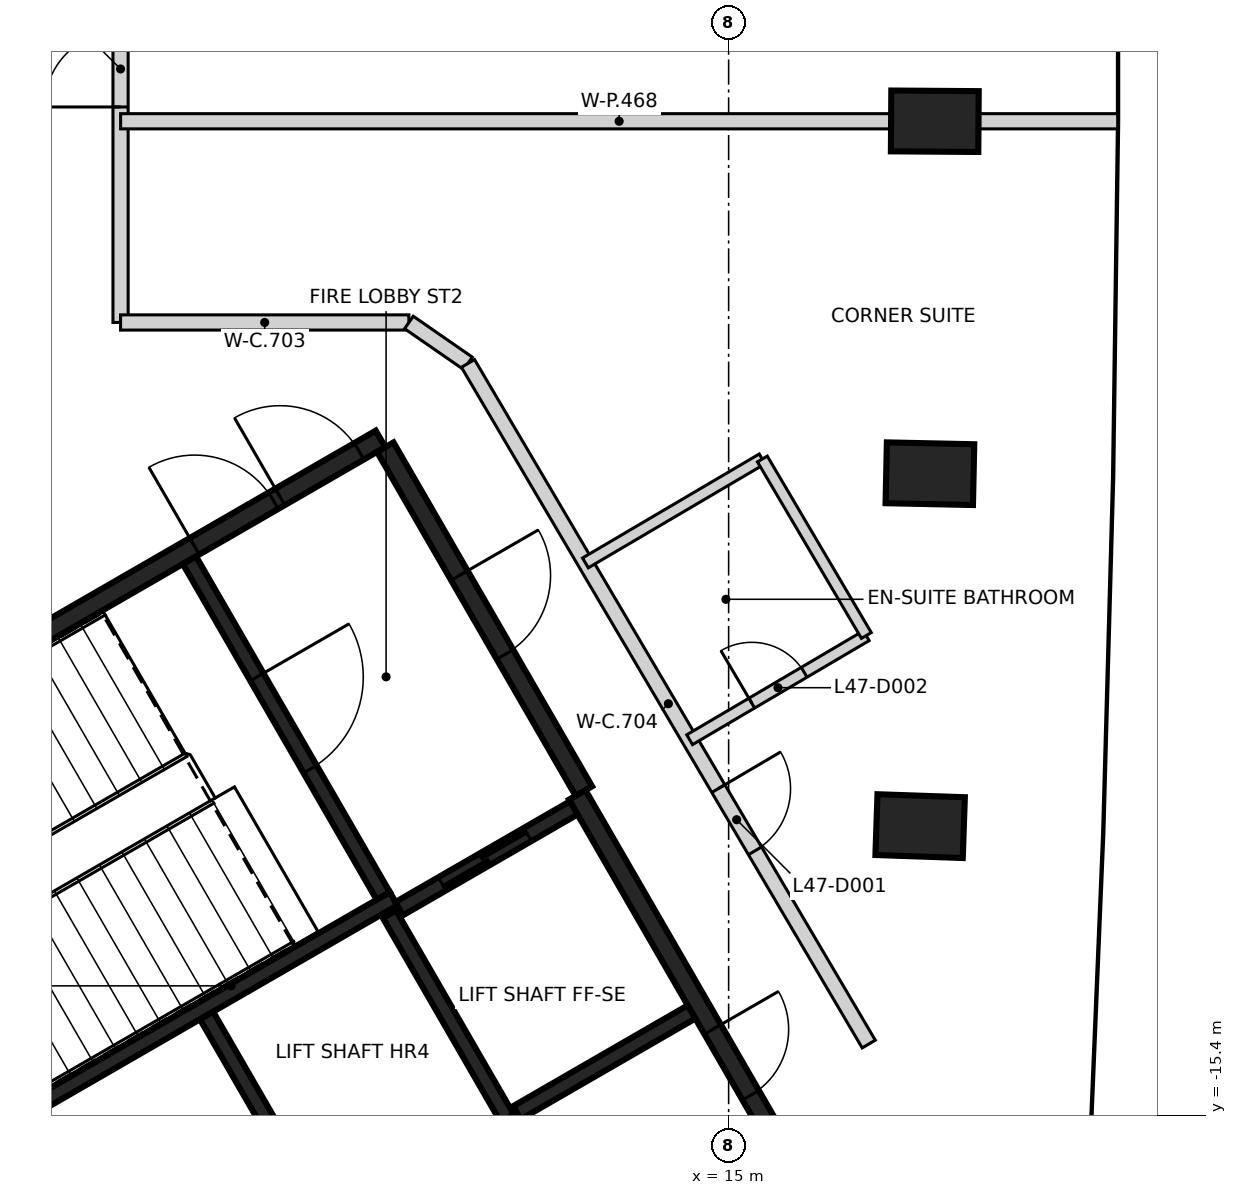
"""IFC4 building model, lengths in metres.
Left out: names, types, materials, properties, quantities, classifications, styles, units other than length and angle.
Written with IfcOpenShell. Run it as: python <this file> out.ifc"""

import sys

from ifc_helpers import new_model, si_unit, direction, frame, frame_2d, origin, origin_2d, place, context, subcontext, project, spatial, rectangle, extrude, element, fill, save


model = new_model("IFC4")
c1 = context("Model", 3, precision=1e-05, world=origin(), true_north=direction((0.0, 1.0)))
c2 = subcontext(c1, "Body", "Model", "MODEL_VIEW")
j1 = project(units=[si_unit("LENGTHUNIT", "METRE"), si_unit("PLANEANGLEUNIT", "RADIAN")], contexts=[c1])
p1 = place(None, origin())
s1 = spatial("IfcSite", under=j1, at=p1, CompositionType="ELEMENT")
p2 = place(p1, origin())
s2 = spatial("IfcBuilding", under=s1, at=p2, CompositionType="ELEMENT")
p3 = place(p2, frame((0.0, 0.0, 190.0)))
s3 = spatial("IfcBuildingStorey", under=s2, at=p3, CompositionType="ELEMENT", Elevation=190.0)
for number, where, z_axis, x_axis in (
    (1, (17.519, -11.592, -0.35), (0.0, 0.0, 1.0), (-0.999, 0.034, 0.0)),
    (2, (17.648, -6.956, -0.35), (0.0, 0.0, 1.0), (-1.0, 0.021, 0.0)),
    (3, (17.712, -2.319, -0.35), (0.0, 0.0, 1.0), (-1.0, 0.007, 0.0)),
):
    element("IfcColumn", number, at=place(p3, frame(where, z_axis=z_axis, x_axis=x_axis)), inside=s3, PredefinedType="COLUMN", context=c2, shape_type="SweptSolid", body=[
        extrude(rectangle(XDim=1.15, YDim=0.8, at=origin_2d()), origin(), (0.0, 0.0, 1.0), 3.6),
    ])
p4 = place(p3, frame((0.417, -12.273, 0.0), z_axis=(0.0, 0.0, 1.0), x_axis=(0.866021906294, 0.500006057782, 0.0)))
e4 = element("IfcWall", 4, at=p4, inside=s3, PredefinedType="SHEAR", context=c2, shape_type="SweptSolid", body=[
    extrude(rectangle(XDim=11.55, YDim=0.25, at=frame_2d((5.775, 0.0))), origin(), (0.0, 0.0, 1.0), 3.25),
])
p5 = place(p4, frame((10.025, 0.0, 0.0)))
e5 = element("IfcOpeningElement", 5, at=p5, cuts=e4, PredefinedType="OPENING", context=c2, shape_type="SweptSolid", body=[
    extrude(rectangle(XDim=1.2, YDim=2.1, at=frame_2d((0.6, 1.05))), frame((0.0, 0.135, 0.0), z_axis=(0.0, -1.0, 0.0), x_axis=(1.0, 0.0, 0.0)), (0.0, 0.0, 1.0), 0.27),
])
p6 = place(p4, frame((8.725, 0.0, 0.0)))
e6 = element("IfcOpeningElement", 6, at=p6, cuts=e4, PredefinedType="OPENING", context=c2, shape_type="SweptSolid", body=[
    extrude(rectangle(XDim=1.2, YDim=2.1, at=frame_2d((0.6, 1.05))), frame((0.0, 0.135, 0.0), z_axis=(0.0, -1.0, 0.0), x_axis=(1.0, 0.0, 0.0)), (0.0, 0.0, 1.0), 0.27),
])
p7 = place(p3, frame((13.008, -11.181, 0.0), z_axis=(0.0, 0.0, 1.0), x_axis=(0.500001955336, -0.866024274868, 0.0)))
e7 = element("IfcWall", 7, at=p7, inside=s3, PredefinedType="SHEAR", context=c2, shape_type="SweptSolid", body=[
    extrude(rectangle(XDim=6.125, YDim=0.25, at=frame_2d((3.062, 0.0))), origin(), (0.0, 0.0, 1.0), 3.25),
])
p8 = place(p7, frame((3.563, 0.0, 0.0)))
e8 = element("IfcOpeningElement", 8, at=p8, cuts=e7, PredefinedType="OPENING", context=c2, shape_type="SweptSolid", body=[
    extrude(rectangle(XDim=1.0, YDim=2.1, at=frame_2d((0.5, 1.05))), frame((0.0, 0.135, 0.0), z_axis=(0.0, -1.0, 0.0), x_axis=(1.0, 0.0, 0.0)), (0.0, 0.0, 1.0), 0.27),
])
p9 = place(p3, frame((10.483, -6.606, 0.0), z_axis=(0.0, 0.0, 1.0), x_axis=(0.49999885962, -0.866026062182, 0.0)))
e9 = element("IfcWall", 9, at=p9, inside=s3, PredefinedType="SHEAR", context=c2, shape_type="SweptSolid", body=[
    extrude(rectangle(XDim=5.225, YDim=0.25, at=frame_2d((2.612, 0.0))), origin(), (0.0, 0.0, 1.0), 3.25),
])
p10 = place(p9, frame((1.95, 0.0, 0.0)))
e10 = element("IfcOpeningElement", 10, at=p10, cuts=e9, PredefinedType="OPENING", context=c2, shape_type="SweptSolid", body=[
    extrude(rectangle(XDim=1.2, YDim=2.1, at=frame_2d((0.6, 1.05))), frame((0.0, 0.135, 0.0), z_axis=(0.0, -1.0, 0.0), x_axis=(1.0, 0.0, 0.0)), (0.0, 0.0, 1.0), 0.27),
])
p11 = place(p3, frame((5.419, -15.534, 0.0), z_axis=(0.0, 0.0, 1.0), x_axis=(0.866029065029, 0.499993658486, 0.0)))
e11 = element("IfcWall", 11, at=p11, inside=s3, PredefinedType="SHEAR", context=c2, shape_type="SweptSolid", body=[
    extrude(rectangle(XDim=5.974, YDim=0.2, at=frame_2d((2.987, 0.0))), origin(), (0.0, 0.0, 1.0), 3.25),
])
p12 = place(p3, frame((7.01, -18.542, 0.0), z_axis=(0.0, 0.0, 1.0), x_axis=(0.866030299012, 0.499991521122, 0.0)))
e12 = element("IfcWall", 12, at=p12, inside=s3, PredefinedType="SHEAR", context=c2, shape_type="SweptSolid", body=[
    extrude(rectangle(XDim=6.1, YDim=0.2, at=frame_2d((3.05, 0.0))), origin(), (0.0, 0.0, 1.0), 3.25),
])
p13 = place(p12, frame((1.0, 0.0, 0.0)))
e13 = element("IfcOpeningElement", 13, at=p13, cuts=e12, PredefinedType="OPENING", context=c2, shape_type="SweptSolid", body=[
    extrude(rectangle(XDim=1.2, YDim=2.1, at=frame_2d((0.6, 1.05))), frame((0.0, 0.11, 0.0), z_axis=(0.0, -1.0, 0.0), x_axis=(1.0, 0.0, 0.0)), (0.0, 0.0, 1.0), 0.22),
])
p14 = place(p12, frame((3.982, 0.0, 0.0)))
e14 = element("IfcOpeningElement", 14, at=p14, cuts=e12, PredefinedType="OPENING", context=c2, shape_type="SweptSolid", body=[
    extrude(rectangle(XDim=1.2, YDim=2.1, at=frame_2d((0.6, 1.05))), frame((0.0, 0.11, 0.0), z_axis=(0.0, -1.0, 0.0), x_axis=(1.0, 0.0, 0.0)), (0.0, 0.0, 1.0), 0.22),
])
p15 = place(p3, frame((7.906, -8.094, 0.0), z_axis=(0.0, 0.0, 1.0), x_axis=(0.500027839223, -0.866009330205, 0.0)))
e15 = element("IfcWall", 15, at=p15, inside=s3, PredefinedType="SHEAR", context=c2, shape_type="SweptSolid", body=[
    extrude(rectangle(XDim=5.098, YDim=0.2, at=frame_2d((2.549, 0.0))), origin(), (0.0, 0.0, 1.0), 3.25),
])
p16 = place(p15, frame((1.774, 0.0, 0.0)))
e16 = element("IfcOpeningElement", 16, at=p16, cuts=e15, PredefinedType="OPENING", context=c2, shape_type="SweptSolid", body=[
    extrude(rectangle(XDim=1.4, YDim=2.1, at=frame_2d((0.7, 1.05))), frame((0.0, 0.11, 0.0), z_axis=(0.0, -1.0, 0.0), x_axis=(1.0, 0.0, 0.0)), (0.0, 0.0, 1.0), 0.22),
])
p17 = place(p3, frame((8.132, -14.084, 0.0), z_axis=(0.0, 0.0, 1.0), x_axis=(0.499997778408, -0.866026686418, 0.0)))
e17 = element("IfcWall", 17, at=p17, inside=s3, PredefinedType="SHEAR", context=c2, shape_type="SweptSolid", body=[
    extrude(rectangle(XDim=3.198, YDim=0.2, at=frame_2d((1.599, 0.0))), origin(), (0.0, 0.0, 1.0), 3.25),
])
p18 = place(p3, frame((12.088, -15.437, 0.0), z_axis=(0.0, 0.0, 1.0), x_axis=(-0.500026960575, 0.86600983753, 0.0)))
e18 = element("IfcWall", 18, at=p18, inside=s3, PredefinedType="SHEAR", context=c2, shape_type="SweptSolid", body=[
    extrude(rectangle(XDim=3.1, YDim=0.2, at=frame_2d((1.55, 0.0))), origin(), (0.0, 0.0, 1.0), 3.25),
])
p19 = place(p3, frame((10.666, -12.678, 0.0), z_axis=(0.0, 0.0, 1.0), x_axis=(0.866018407898, 0.500012117035, 0.0)))
e19 = element("IfcWall", 19, at=p19, inside=s3, PredefinedType="SHEAR", context=c2, shape_type="SweptSolid", body=[
    extrude(rectangle(XDim=2.651, YDim=0.2, at=frame_2d((1.325, 0.0))), origin(), (0.0, 0.0, 1.0), 3.25),
])
p20 = place(p19, frame((0.652, 0.0, 0.0)))
e20 = element("IfcOpeningElement", 20, at=p20, cuts=e19, PredefinedType="OPENING", context=c2, shape_type="SweptSolid", body=[
    extrude(rectangle(XDim=1.3, YDim=2.1, at=frame_2d((0.65, 1.05))), frame((0.0, 0.11, 0.0), z_axis=(0.0, -1.0, 0.0), x_axis=(1.0, 0.0, 0.0)), (0.0, 0.0, 1.0), 0.22),
])
p21 = place(p3, frame((14.512, -14.037, 0.0), z_axis=(0.0, 0.0, 1.0), x_axis=(-0.866018407898, -0.500012117035, 0.0)))
e21 = element("IfcWall", 21, at=p21, inside=s3, PredefinedType="SHEAR", context=c2, shape_type="SweptSolid", body=[
    extrude(rectangle(XDim=2.651, YDim=0.2, at=frame_2d((1.325, 0.0))), origin(), (0.0, 0.0, 1.0), 3.25),
])
p22 = place(p3, frame((7.0, -4.966, 0.0), z_axis=(0.0, 0.0, 1.0), x_axis=(0.0, 1.0, 0.0)))
e22 = element("IfcWall", 22, at=p22, inside=s3, PredefinedType="PARTITIONING", context=c2, shape_type="SweptSolid", body=[
    extrude(rectangle(XDim=13.225, YDim=0.2, at=frame_2d((6.612, 0.0))), origin(), (0.0, 0.0, 1.0), 3.25),
])
p23 = place(p22, frame((2.835, 0.0, 0.0)))
e23 = element("IfcOpeningElement", 23, at=p23, cuts=e22, PredefinedType="OPENING", context=c2, shape_type="SweptSolid", body=[
    extrude(rectangle(XDim=1.0, YDim=2.1, at=frame_2d((0.5, 1.05))), frame((0.0, 0.11, 0.0), z_axis=(0.0, -1.0, 0.0), x_axis=(1.0, 0.0, 0.0)), (0.0, 0.0, 1.0), 0.22),
])
p24 = place(p22, frame((12.045, 0.0, 0.0)))
e24 = element("IfcOpeningElement", 24, at=p24, cuts=e22, PredefinedType="OPENING", context=c2, shape_type="SweptSolid", body=[
    extrude(rectangle(XDim=0.95, YDim=2.1, at=frame_2d((0.475, 1.05))), frame((0.0, 0.11, 0.0), z_axis=(0.0, -1.0, 0.0), x_axis=(1.0, 0.0, 0.0)), (0.0, 0.0, 1.0), 0.22),
])
p25 = place(p3, frame((7.0, -4.966, 0.0), z_axis=(0.0, 0.0, 1.0), x_axis=(1.0, 0.0, 0.0)))
e25 = element("IfcWall", 25, at=p25, inside=s3, PredefinedType="PARTITIONING", context=c2, shape_type="SweptSolid", body=[
    extrude(rectangle(XDim=3.793, YDim=0.2, at=frame_2d((1.896, 0.0))), origin(), (0.0, 0.0, 1.0), 3.25),
])
p26 = place(p3, frame((10.794, -4.966, 0.0), z_axis=(0.0, 0.0, 1.0), x_axis=(0.822266583859, -0.569102508401, 0.0)))
e26 = element("IfcWall", 26, at=p26, inside=s3, PredefinedType="PARTITIONING", context=c2, shape_type="SweptSolid", body=[
    extrude(rectangle(XDim=0.945, YDim=0.2, at=frame_2d((0.473, 0.0))), origin(), (0.0, 0.0, 1.0), 3.25),
])
p27 = place(p3, frame((11.571, -5.505, 0.0), z_axis=(0.0, 0.0, 1.0), x_axis=(0.507402039651, -0.861709446483, 0.0)))
e27 = element("IfcWall", 27, at=p27, inside=s3, PredefinedType="PARTITIONING", context=c2, shape_type="SweptSolid", body=[
    extrude(rectangle(XDim=10.391, YDim=0.2, at=frame_2d((5.196, 0.0))), origin(), (0.0, 0.0, 1.0), 3.25),
])
p28 = place(p27, frame((6.491, 0.0, 0.0)))
e28 = element("IfcOpeningElement", 28, at=p28, cuts=e27, PredefinedType="OPENING", context=c2, shape_type="SweptSolid", body=[
    extrude(rectangle(XDim=0.95, YDim=2.1, at=frame_2d((0.475, 1.05))), frame((0.0, 0.11, 0.0), z_axis=(0.0, -1.0, 0.0), x_axis=(1.0, 0.0, 0.0)), (0.0, 0.0, 1.0), 0.22),
])
p29 = place(p3, frame((7.001, -2.319, 0.0), z_axis=(0.0, 0.0, 1.0), x_axis=(1.0, 0.0, 0.0)))
e29 = element("IfcWall", 29, at=p29, inside=s3, PredefinedType="PARTITIONING", context=c2, shape_type="SweptSolid", body=[
    extrude(rectangle(XDim=13.117, YDim=0.2, at=frame_2d((6.559, 0.0))), origin(), (0.0, 0.0, 1.0), 3.25),
])
p30 = place(p3, frame((13.116, -8.129, 0.0), z_axis=(0.0, 0.0, 1.0), x_axis=(0.861885352062, 0.507103184669, 0.0)))
e30 = element("IfcWall", 30, at=p30, inside=s3, PredefinedType="PARTITIONING", context=c2, shape_type="SweptSolid", body=[
    extrude(rectangle(XDim=2.698, YDim=0.15, at=frame_2d((1.349, 0.0))), origin(), (0.0, 0.0, 1.0), 3.25),
])
p31 = place(p3, frame((14.487, -10.455, 0.0), z_axis=(0.0, 0.0, 1.0), x_axis=(0.861752634979, 0.507328686461, 0.0)))
e31 = element("IfcWall", 31, at=p31, inside=s3, PredefinedType="PARTITIONING", context=c2, shape_type="SweptSolid", body=[
    extrude(rectangle(XDim=2.697, YDim=0.15, at=frame_2d((1.348, 0.0))), origin(), (0.0, 0.0, 1.0), 3.25),
])
p32 = place(p31, frame((0.948, 0.0, 0.0)))
e32 = element("IfcOpeningElement", 32, at=p32, cuts=e31, PredefinedType="OPENING", context=c2, shape_type="SweptSolid", body=[
    extrude(rectangle(XDim=0.8, YDim=2.1, at=frame_2d((0.4, 1.05))), frame((0.0, 0.085, 0.0), z_axis=(0.0, -1.0, 0.0), x_axis=(1.0, 0.0, 0.0)), (0.0, 0.0, 1.0), 0.17),
])
p33 = place(p3, frame((15.444, -6.762, 0.0), z_axis=(0.0, 0.0, 1.0), x_axis=(0.507578234334, -0.861605673165, 0.0)))
e33 = element("IfcWall", 33, at=p33, inside=s3, PredefinedType="PARTITIONING", context=c2, shape_type="SweptSolid", body=[
    extrude(rectangle(XDim=2.695, YDim=0.15, at=frame_2d((1.348, 0.0))), origin(), (0.0, 0.0, 1.0), 3.25),
])
p34 = place(p20, origin())
e34 = element("IfcDoor", 34, at=p34, inside=s3, OperationType="SLIDING_TO_LEFT", PredefinedType="DOOR", context=c2, shape_type="SweptSolid", body=[
    extrude(rectangle(XDim=1.3, YDim=2.1, at=frame_2d((0.65, 1.05))), frame((0.0, 0.025, 0.0), z_axis=(0.0, -1.0, 0.0), x_axis=(1.0, 0.0, 0.0)), (0.0, 0.0, 1.0), 0.05),
])
fill(e20, e34)
p35 = place(p8, origin())
e35 = element("IfcDoor", 35, at=p35, inside=s3, OperationType="SINGLE_SWING_LEFT", PredefinedType="DOOR", context=c2, shape_type="SweptSolid", body=[
    extrude(rectangle(XDim=1.0, YDim=2.1, at=frame_2d((0.5, 1.05))), frame((0.0, 0.025, 0.0), z_axis=(0.0, -1.0, 0.0), x_axis=(1.0, 0.0, 0.0)), (0.0, 0.0, 1.0), 0.05),
])
fill(e8, e35)
p36 = place(p5, origin())
e36 = element("IfcDoor", 36, at=p36, inside=s3, OperationType="SINGLE_SWING_LEFT", PredefinedType="DOOR", context=c2, shape_type="SweptSolid", body=[
    extrude(rectangle(XDim=1.2, YDim=2.1, at=frame_2d((0.6, 1.05))), frame((0.0, 0.025, 0.0), z_axis=(0.0, -1.0, 0.0), x_axis=(1.0, 0.0, 0.0)), (0.0, 0.0, 1.0), 0.05),
])
fill(e5, e36)
p37 = place(p6, origin())
e37 = element("IfcDoor", 37, at=p37, inside=s3, OperationType="SINGLE_SWING_RIGHT", PredefinedType="DOOR", context=c2, shape_type="SweptSolid", body=[
    extrude(rectangle(XDim=1.2, YDim=2.1, at=frame_2d((0.6, 1.05))), frame((0.0, 0.025, 0.0), z_axis=(0.0, -1.0, 0.0), x_axis=(1.0, 0.0, 0.0)), (0.0, 0.0, 1.0), 0.05),
])
fill(e6, e37)
p38 = place(p16, origin())
e38 = element("IfcDoor", 38, at=p38, inside=s3, OperationType="SINGLE_SWING_LEFT", PredefinedType="DOOR", context=c2, shape_type="SweptSolid", body=[
    extrude(rectangle(XDim=1.4, YDim=2.1, at=frame_2d((0.7, 1.05))), frame((0.0, 0.025, 0.0), z_axis=(0.0, -1.0, 0.0), x_axis=(1.0, 0.0, 0.0)), (0.0, 0.0, 1.0), 0.05),
])
fill(e16, e38)
p39 = place(p10, origin())
e39 = element("IfcDoor", 39, at=p39, inside=s3, OperationType="SINGLE_SWING_RIGHT", PredefinedType="DOOR", context=c2, shape_type="SweptSolid", body=[
    extrude(rectangle(XDim=1.2, YDim=2.1, at=frame_2d((0.6, 1.05))), frame((0.0, 0.025, 0.0), z_axis=(0.0, -1.0, 0.0), x_axis=(1.0, 0.0, 0.0)), (0.0, 0.0, 1.0), 0.05),
])
fill(e10, e39)
p40 = place(p28, origin())
e40 = element("IfcDoor", 40, at=p40, inside=s3, OperationType="SINGLE_SWING_LEFT", PredefinedType="DOOR", context=c2, shape_type="SweptSolid", body=[
    extrude(rectangle(XDim=0.95, YDim=2.1, at=frame_2d((0.475, 1.05))), frame((0.0, 0.025, 0.0), z_axis=(0.0, -1.0, 0.0), x_axis=(1.0, 0.0, 0.0)), (0.0, 0.0, 1.0), 0.05),
])
fill(e28, e40)
p41 = place(p32, frame((0.8, 0.0, 0.0), z_axis=(0.0, 0.0, 1.0), x_axis=(-1.0, 0.0, 0.0)))
e41 = element("IfcDoor", 41, at=p41, inside=s3, OperationType="SINGLE_SWING_LEFT", PredefinedType="DOOR", context=c2, shape_type="SweptSolid", body=[
    extrude(rectangle(XDim=0.8, YDim=2.1, at=frame_2d((0.4, 1.05))), frame((0.0, 0.025, 0.0), z_axis=(0.0, -1.0, 0.0), x_axis=(1.0, 0.0, 0.0)), (0.0, 0.0, 1.0), 0.05),
])
fill(e32, e41)
p42 = place(p23, frame((1.0, 0.0, 0.0), z_axis=(0.0, 0.0, 1.0), x_axis=(-1.0, 0.0, 0.0)))
e42 = element("IfcDoor", 42, at=p42, inside=s3, OperationType="SINGLE_SWING_LEFT", PredefinedType="DOOR", context=c2, shape_type="SweptSolid", body=[
    extrude(rectangle(XDim=1.0, YDim=2.1, at=frame_2d((0.5, 1.05))), frame((0.0, 0.025, 0.0), z_axis=(0.0, -1.0, 0.0), x_axis=(1.0, 0.0, 0.0)), (0.0, 0.0, 1.0), 0.05),
])
fill(e23, e42)
save(model, sys.argv[1])
